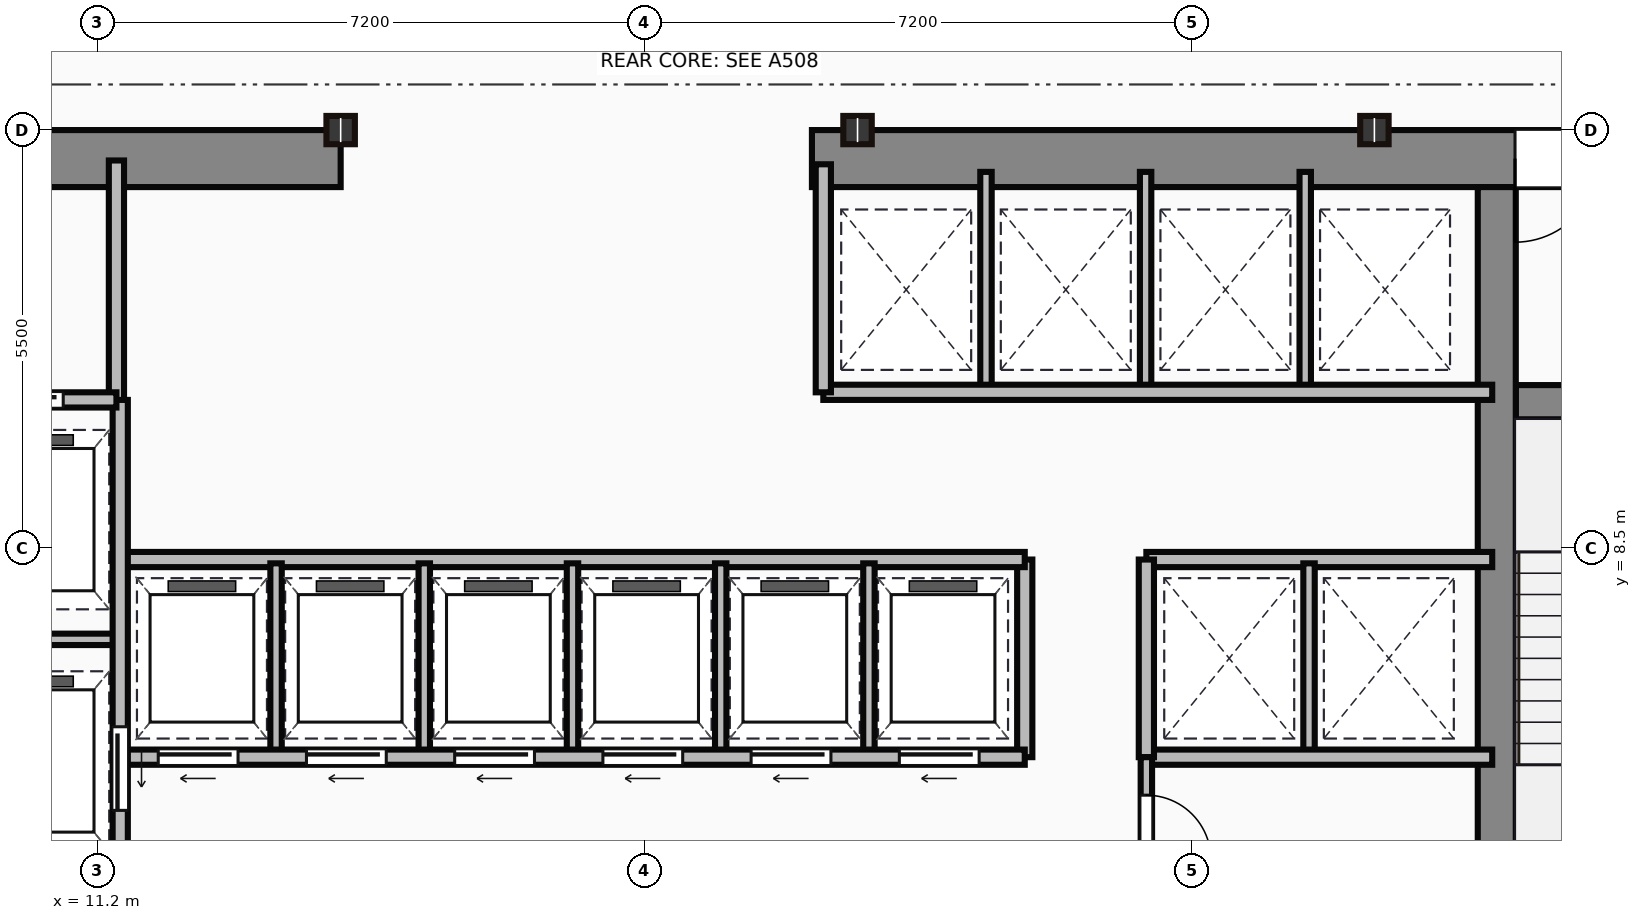
"""IFC4 building model, lengths in metres.
Left out: names, types, materials, properties, quantities, classifications, styles, units other than length and angle.
Written with IfcOpenShell. Run it as: python <this file> out.ifc"""

import sys

from ifc_helpers import new_model, si_unit, direction, frame, frame_2d, origin, origin_2d, place, context, subcontext, project, spatial, rectangle, i_section, extrude, source, transform, mapped, element, fill, save


model = new_model("IFC4")
c1 = context("Model", 3, precision=1e-05, world=origin(), true_north=direction((0.0, 1.0)))
c2 = subcontext(c1, "Body", "Model", "MODEL_VIEW")
j1 = project(units=[si_unit("LENGTHUNIT", "METRE"), si_unit("PLANEANGLEUNIT", "RADIAN")], contexts=[c1])
p1 = place(None, origin())
s1 = spatial("IfcSite", under=j1, at=p1, CompositionType="ELEMENT")
p2 = place(p1, origin())
s2 = spatial("IfcBuilding", under=s1, at=p2, CompositionType="ELEMENT")
p3 = place(p2, frame((0.0, 0.0, 180.75)))
s3 = spatial("IfcBuildingStorey", under=s2, at=p3, CompositionType="ELEMENT", Elevation=180.75)
m1 = source(origin(), c2, "Body", "SweptSolid", [
    extrude(rectangle(XDim=9.1, YDim=0.75, at=frame_2d((4.55, 0.0))), origin(), (0.0, 0.0, 1.0), 3.65),
])
p4 = place(p3, frame((5.3, 13.625, 0.0), z_axis=(0.0, 0.0, 1.0), x_axis=(1.0, 0.0, 0.0)))
e1 = element("IfcWall", 1, at=p4, inside=s3, PredefinedType="SHEAR", context=c2, shape_type="MappedRepresentation", body=[
    mapped(m1, transform((0.0, 0.0, 0.0))),
])
p5 = place(p4, frame((4.1, 0.0, 0.0)))
e2 = element("IfcOpeningElement", 2, at=p5, cuts=e1, PredefinedType="OPENING", context=c2, shape_type="SweptSolid", body=[
    extrude(rectangle(XDim=1.1, YDim=2.15, at=frame_2d((0.55, 1.075))), frame((0.0, 0.385, 0.0), z_axis=(0.0, -1.0, 0.0), x_axis=(1.0, 0.0, 0.0)), (0.0, 0.0, 1.0), 0.77),
])
m2 = source(origin(), c2, "Body", "SweptSolid", [
    extrude(rectangle(XDim=12.6, YDim=0.75, at=frame_2d((6.3, 0.0))), origin(), (0.0, 0.0, 1.0), 3.65),
])
p6 = place(p3, frame((20.6, 13.625, 0.0), z_axis=(0.0, 0.0, 1.0), x_axis=(1.0, 0.0, 0.0)))
e3 = element("IfcWall", 3, at=p6, inside=s3, PredefinedType="SHEAR", context=c2, shape_type="MappedRepresentation", body=[
    mapped(m2, transform((0.0, 0.0, 0.0))),
])
p7 = place(p6, frame((9.25, 0.0, 0.0)))
e4 = element("IfcOpeningElement", 4, at=p7, cuts=e3, PredefinedType="OPENING", context=c2, shape_type="SweptSolid", body=[
    extrude(rectangle(XDim=1.1, YDim=2.15, at=frame_2d((0.55, 1.075))), frame((0.0, 0.385, 0.0), z_axis=(0.0, -1.0, 0.0), x_axis=(1.0, 0.0, 0.0)), (0.0, 0.0, 1.0), 0.77),
])
m3 = source(origin(), c2, "Body", "SweptSolid", [
    extrude(rectangle(XDim=12.35, YDim=0.5, at=frame_2d((6.175, 0.0))), origin(), (0.0, 0.0, 1.0), 3.65),
])
p8 = place(p3, frame((29.61, 0.9, 0.0), z_axis=(0.0, 0.0, 1.0), x_axis=(0.0, 1.0, 0.0)))
e5 = element("IfcWall", 5, at=p8, inside=s3, PredefinedType="SHEAR", context=c2, shape_type="MappedRepresentation", body=[
    mapped(m3, transform((0.0, 0.0, 0.0))),
])
m4 = source(origin(), c2, "Body", "SweptSolid", [
    extrude(rectangle(XDim=3.39, YDim=0.45, at=frame_2d((1.695, 0.0))), origin(), (0.0, 0.0, 1.0), 3.65),
])
p9 = place(p3, frame((29.86, 10.42, 0.0), z_axis=(0.0, 0.0, 1.0), x_axis=(1.0, 0.0, 0.0)))
e6 = element("IfcWall", 6, at=p9, inside=s3, PredefinedType="SHEAR", context=c2, shape_type="MappedRepresentation", body=[
    mapped(m4, transform((0.0, 0.0, 0.0))),
])
p10 = place(p9, frame((1.1, 0.0, 0.0)))
e7 = element("IfcOpeningElement", 7, at=p10, cuts=e6, PredefinedType="OPENING", context=c2, shape_type="SweptSolid", body=[
    extrude(rectangle(XDim=1.1, YDim=2.15, at=frame_2d((0.55, 1.075))), frame((0.0, 0.235, 0.0), z_axis=(0.0, -1.0, 0.0), x_axis=(1.0, 0.0, 0.0)), (0.0, 0.0, 1.0), 0.47),
])
m5 = source(origin(), c2, "Body", "SweptSolid", [
    extrude(i_section(OverallWidth=0.374, OverallDepth=0.372, WebThickness=0.016, FlangeThickness=0.026, at=origin_2d()), origin(), (0.0, 0.0, 1.0), 3.65),
])
for number, where, z_axis, x_axis in (
    (8, (14.4, 14.0, 0.0), (0.0, 0.0, 1.0), (1.0, 0.0, 0.0)),
    (9, (21.2, 14.0, 0.0), (0.0, 0.0, 1.0), (1.0, 0.0, 0.0)),
    (10, (28.0, 14.0, 0.0), (0.0, 0.0, 1.0), (1.0, 0.0, 0.0)),
):
    element("IfcColumn", number, at=place(p3, frame(where, z_axis=z_axis, x_axis=x_axis)), inside=s3, PredefinedType="COLUMN", context=c2, shape_type="MappedRepresentation", body=[
        mapped(m5, transform((0.0, 0.0, 0.0))),
    ])
m6 = source(origin(), c2, "Body", "SweptSolid", [
    extrude(rectangle(XDim=3.18, YDim=0.2, at=frame_2d((1.59, 0.0))), origin(), (0.0, 0.0, 1.0), 3.4),
])
p11 = place(p3, frame((11.45, 10.42, 0.0), z_axis=(0.0, 0.0, 1.0), x_axis=(0.0, 1.0, 0.0)))
e11 = element("IfcWall", 11, at=p11, inside=s3, PredefinedType="PARTITIONING", context=c2, shape_type="MappedRepresentation", body=[
    mapped(m6, transform((0.0, 0.0, 0.0))),
])
m7 = source(origin(), c2, "Body", "SweptSolid", [
    extrude(rectangle(XDim=2.35, YDim=0.2, at=frame_2d((1.175, 0.0))), origin(), (0.0, 0.0, 1.0), 3.4),
])
p12 = place(p3, frame((9.1, 10.45, 0.0), z_axis=(0.0, 0.0, 1.0), x_axis=(1.0, 0.0, 0.0)))
e12 = element("IfcWall", 12, at=p12, inside=s3, PredefinedType="PARTITIONING", context=c2, shape_type="MappedRepresentation", body=[
    mapped(m7, transform((0.0, 0.0, 0.0))),
])
p13 = place(p12, frame((0.55, 0.0, 0.0)))
e13 = element("IfcOpeningElement", 13, at=p13, cuts=e12, PredefinedType="OPENING", context=c2, shape_type="SweptSolid", body=[
    extrude(rectangle(XDim=1.1, YDim=2.15, at=frame_2d((0.55, 1.075))), frame((0.0, 0.11, 0.0), z_axis=(0.0, -1.0, 0.0), x_axis=(1.0, 0.0, 0.0)), (0.0, 0.0, 1.0), 0.22),
])
m8 = source(origin(), c2, "Body", "SweptSolid", [
    extrude(rectangle(XDim=9.6, YDim=0.2, at=frame_2d((4.8, 0.0))), origin(), (0.0, 0.0, 1.0), 3.4),
])
p14 = place(p3, frame((11.5, 0.85, 0.0), z_axis=(0.0, 0.0, 1.0), x_axis=(0.0, 1.0, 0.0)))
e14 = element("IfcWall", 14, at=p14, inside=s3, PredefinedType="PARTITIONING", context=c2, shape_type="MappedRepresentation", body=[
    mapped(m8, transform((0.0, 0.0, 0.0))),
])
p15 = place(p14, frame((4.2, 0.0, 0.0)))
e15 = element("IfcOpeningElement", 15, at=p15, cuts=e14, PredefinedType="OPENING", context=c2, shape_type="SweptSolid", body=[
    extrude(rectangle(XDim=1.1, YDim=2.15, at=frame_2d((0.55, 1.075))), frame((0.0, 0.11, 0.0), z_axis=(0.0, -1.0, 0.0), x_axis=(1.0, 0.0, 0.0)), (0.0, 0.0, 1.0), 0.22),
])
p16 = place(p14, frame((0.9, 0.0, 0.0)))
e16 = element("IfcOpeningElement", 16, at=p16, cuts=e14, PredefinedType="OPENING", context=c2, shape_type="SweptSolid", body=[
    extrude(rectangle(XDim=1.2, YDim=2.15, at=frame_2d((0.6, 1.075))), frame((0.0, 0.11, 0.0), z_axis=(0.0, -1.0, 0.0), x_axis=(1.0, 0.0, 0.0)), (0.0, 0.0, 1.0), 0.22),
])
m9 = source(origin(), c2, "Body", "SweptSolid", [
    extrude(rectangle(XDim=2.4, YDim=0.15, at=frame_2d((1.2, 0.0))), origin(), (0.0, 0.0, 1.0), 3.4),
])
p17 = place(p3, frame((9.1, 7.3, 0.0), z_axis=(0.0, 0.0, 1.0), x_axis=(1.0, 0.0, 0.0)))
e17 = element("IfcWall", 17, at=p17, inside=s3, PredefinedType="PARTITIONING", context=c2, shape_type="MappedRepresentation", body=[
    mapped(m9, transform((0.0, 0.0, 0.0))),
])
m10 = source(origin(), c2, "Body", "SweptSolid", [
    extrude(rectangle(XDim=11.85, YDim=0.2, at=frame_2d((5.925, 0.0))), origin(), (0.0, 0.0, 1.0), 3.4),
])
p18 = place(p3, frame((11.55, 5.75, 0.0), z_axis=(0.0, 0.0, 1.0), x_axis=(1.0, 0.0, 0.0)))
e18 = element("IfcWall", 18, at=p18, inside=s3, PredefinedType="PARTITIONING", context=c2, shape_type="MappedRepresentation", body=[
    mapped(m10, transform((0.0, 0.0, 0.0))),
])
p19 = place(p18, frame((0.45, 0.0, 0.0)))
e19 = element("IfcOpeningElement", 19, at=p19, cuts=e18, PredefinedType="OPENING", context=c2, shape_type="SweptSolid", body=[
    extrude(rectangle(XDim=1.05, YDim=2.15, at=frame_2d((0.525, 1.075))), frame((0.0, 0.11, 0.0), z_axis=(0.0, -1.0, 0.0), x_axis=(1.0, 0.0, 0.0)), (0.0, 0.0, 1.0), 0.22),
])
p20 = place(p18, frame((2.4, 0.0, 0.0)))
e20 = element("IfcOpeningElement", 20, at=p20, cuts=e18, PredefinedType="OPENING", context=c2, shape_type="SweptSolid", body=[
    extrude(rectangle(XDim=1.05, YDim=2.15, at=frame_2d((0.525, 1.075))), frame((0.0, 0.11, 0.0), z_axis=(0.0, -1.0, 0.0), x_axis=(1.0, 0.0, 0.0)), (0.0, 0.0, 1.0), 0.22),
])
p21 = place(p18, frame((4.35, 0.0, 0.0)))
e21 = element("IfcOpeningElement", 21, at=p21, cuts=e18, PredefinedType="OPENING", context=c2, shape_type="SweptSolid", body=[
    extrude(rectangle(XDim=1.05, YDim=2.15, at=frame_2d((0.525, 1.075))), frame((0.0, 0.11, 0.0), z_axis=(0.0, -1.0, 0.0), x_axis=(1.0, 0.0, 0.0)), (0.0, 0.0, 1.0), 0.22),
])
p22 = place(p18, frame((6.3, 0.0, 0.0)))
e22 = element("IfcOpeningElement", 22, at=p22, cuts=e18, PredefinedType="OPENING", context=c2, shape_type="SweptSolid", body=[
    extrude(rectangle(XDim=1.05, YDim=2.15, at=frame_2d((0.525, 1.075))), frame((0.0, 0.11, 0.0), z_axis=(0.0, -1.0, 0.0), x_axis=(1.0, 0.0, 0.0)), (0.0, 0.0, 1.0), 0.22),
])
p23 = place(p18, frame((8.25, 0.0, 0.0)))
e23 = element("IfcOpeningElement", 23, at=p23, cuts=e18, PredefinedType="OPENING", context=c2, shape_type="SweptSolid", body=[
    extrude(rectangle(XDim=1.05, YDim=2.15, at=frame_2d((0.525, 1.075))), frame((0.0, 0.11, 0.0), z_axis=(0.0, -1.0, 0.0), x_axis=(1.0, 0.0, 0.0)), (0.0, 0.0, 1.0), 0.22),
])
p24 = place(p18, frame((10.2, 0.0, 0.0)))
e24 = element("IfcOpeningElement", 24, at=p24, cuts=e18, PredefinedType="OPENING", context=c2, shape_type="SweptSolid", body=[
    extrude(rectangle(XDim=1.05, YDim=2.15, at=frame_2d((0.525, 1.075))), frame((0.0, 0.11, 0.0), z_axis=(0.0, -1.0, 0.0), x_axis=(1.0, 0.0, 0.0)), (0.0, 0.0, 1.0), 0.22),
])
p25 = place(p3, frame((11.55, 8.35, 0.0), z_axis=(0.0, 0.0, 1.0), x_axis=(1.0, 0.0, 0.0)))
e25 = element("IfcWall", 25, at=p25, inside=s3, PredefinedType="PARTITIONING", context=c2, shape_type="MappedRepresentation", body=[
    mapped(m10, transform((0.0, 0.0, 0.0))),
])
m11 = source(origin(), c2, "Body", "SweptSolid", [
    extrude(rectangle(XDim=2.6, YDim=0.2, at=frame_2d((1.3, 0.0))), origin(), (0.0, 0.0, 1.0), 3.4),
])
p26 = place(p3, frame((23.4, 5.75, 0.0), z_axis=(0.0, 0.0, 1.0), x_axis=(0.0, 1.0, 0.0)))
e26 = element("IfcWall", 26, at=p26, inside=s3, PredefinedType="PARTITIONING", context=c2, shape_type="MappedRepresentation", body=[
    mapped(m11, transform((0.0, 0.0, 0.0))),
])
m12 = source(origin(), c2, "Body", "SweptSolid", [
    extrude(rectangle(XDim=2.5, YDim=0.15, at=frame_2d((1.25, 0.0))), origin(), (0.0, 0.0, 1.0), 3.4),
])
for number, where, z_axis, x_axis in (
    (27, (13.55, 5.8, 0.0), (0.0, 0.0, 1.0), (0.0, 1.0, 0.0)),
    (28, (15.5, 5.8, 0.0), (0.0, 0.0, 1.0), (0.0, 1.0, 0.0)),
    (29, (17.45, 5.8, 0.0), (0.0, 0.0, 1.0), (0.0, 1.0, 0.0)),
    (30, (19.4, 5.8, 0.0), (0.0, 0.0, 1.0), (0.0, 1.0, 0.0)),
    (31, (21.35, 5.8, 0.0), (0.0, 0.0, 1.0), (0.0, 1.0, 0.0)),
):
    element("IfcWall", number, at=place(p3, frame(where, z_axis=z_axis, x_axis=x_axis)), inside=s3, PredefinedType="PARTITIONING", context=c2, shape_type="MappedRepresentation", body=[
        mapped(m12, transform((0.0, 0.0, 0.0))),
    ])
m13 = source(origin(), c2, "Body", "SweptSolid", [
    extrude(rectangle(XDim=8.8, YDim=0.2, at=frame_2d((4.4, 0.0))), origin(), (0.0, 0.0, 1.0), 3.4),
])
p27 = place(p3, frame((20.75, 10.55, 0.0), z_axis=(0.0, 0.0, 1.0), x_axis=(1.0, 0.0, 0.0)))
e32 = element("IfcWall", 32, at=p27, inside=s3, PredefinedType="PARTITIONING", context=c2, shape_type="MappedRepresentation", body=[
    mapped(m13, transform((0.0, 0.0, 0.0))),
])
m14 = source(origin(), c2, "Body", "SweptSolid", [
    extrude(rectangle(XDim=3.0, YDim=0.2, at=frame_2d((1.5, 0.0))), origin(), (0.0, 0.0, 1.0), 3.4),
])
p28 = place(p3, frame((20.75, 10.55, 0.0), z_axis=(0.0, 0.0, 1.0), x_axis=(0.0, 1.0, 0.0)))
e33 = element("IfcWall", 33, at=p28, inside=s3, PredefinedType="PARTITIONING", context=c2, shape_type="MappedRepresentation", body=[
    mapped(m14, transform((0.0, 0.0, 0.0))),
])
m15 = source(origin(), c2, "Body", "SweptSolid", [
    extrude(rectangle(XDim=2.85, YDim=0.15, at=frame_2d((1.425, 0.0))), origin(), (0.0, 0.0, 1.0), 3.4),
])
for number, where, z_axis, x_axis in (
    (34, (22.89, 10.6, 0.0), (0.0, 0.0, 1.0), (0.0, 1.0, 0.0)),
    (35, (24.99, 10.6, 0.0), (0.0, 0.0, 1.0), (0.0, 1.0, 0.0)),
    (36, (27.09, 10.6, 0.0), (0.0, 0.0, 1.0), (0.0, 1.0, 0.0)),
):
    element("IfcWall", number, at=place(p3, frame(where, z_axis=z_axis, x_axis=x_axis)), inside=s3, PredefinedType="PARTITIONING", context=c2, shape_type="MappedRepresentation", body=[
        mapped(m15, transform((0.0, 0.0, 0.0))),
    ])
m16 = source(origin(), c2, "Body", "SweptSolid", [
    extrude(rectangle(XDim=4.55, YDim=0.2, at=frame_2d((2.275, 0.0))), origin(), (0.0, 0.0, 1.0), 3.4),
])
for number, where, z_axis, x_axis in (
    (37, (25.0, 8.35, 0.0), (0.0, 0.0, 1.0), (1.0, 0.0, 0.0)),
    (38, (25.0, 5.75, 0.0), (0.0, 0.0, 1.0), (1.0, 0.0, 0.0)),
):
    element("IfcWall", number, at=place(p3, frame(where, z_axis=z_axis, x_axis=x_axis)), inside=s3, PredefinedType="PARTITIONING", context=c2, shape_type="MappedRepresentation", body=[
        mapped(m16, transform((0.0, 0.0, 0.0))),
    ])
p29 = place(p3, frame((25.0, 5.75, 0.0), z_axis=(0.0, 0.0, 1.0), x_axis=(0.0, 1.0, 0.0)))
e39 = element("IfcWall", 39, at=p29, inside=s3, PredefinedType="PARTITIONING", context=c2, shape_type="MappedRepresentation", body=[
    mapped(m11, transform((0.0, 0.0, 0.0))),
])
p30 = place(p3, frame((27.14, 5.8, 0.0), z_axis=(0.0, 0.0, 1.0), x_axis=(0.0, 1.0, 0.0)))
e40 = element("IfcWall", 40, at=p30, inside=s3, PredefinedType="PARTITIONING", context=c2, shape_type="MappedRepresentation", body=[
    mapped(m12, transform((0.0, 0.0, 0.0))),
])
m17 = source(origin(), c2, "Body", "SweptSolid", [
    extrude(rectangle(XDim=4.9, YDim=0.15, at=frame_2d((2.45, 0.0))), origin(), (0.0, 0.0, 1.0), 3.4),
])
p31 = place(p3, frame((25.0, 0.85, 0.0), z_axis=(0.0, 0.0, 1.0), x_axis=(0.0, 1.0, 0.0)))
e41 = element("IfcWall", 41, at=p31, inside=s3, PredefinedType="PARTITIONING", context=c2, shape_type="MappedRepresentation", body=[
    mapped(m17, transform((0.0, 0.0, 0.0))),
])
p32 = place(p31, frame((1.85, 0.0, 0.0)))
e42 = element("IfcOpeningElement", 42, at=p32, cuts=e41, PredefinedType="OPENING", context=c2, shape_type="SweptSolid", body=[
    extrude(rectangle(XDim=0.95, YDim=2.15, at=frame_2d((0.475, 1.075))), frame((0.0, 0.085, 0.0), z_axis=(0.0, -1.0, 0.0), x_axis=(1.0, 0.0, 0.0)), (0.0, 0.0, 1.0), 0.17),
])
p33 = place(p31, frame((3.55, 0.0, 0.0)))
e43 = element("IfcOpeningElement", 43, at=p33, cuts=e41, PredefinedType="OPENING", context=c2, shape_type="SweptSolid", body=[
    extrude(rectangle(XDim=0.85, YDim=2.15, at=frame_2d((0.425, 1.075))), frame((0.0, 0.085, 0.0), z_axis=(0.0, -1.0, 0.0), x_axis=(1.0, 0.0, 0.0)), (0.0, 0.0, 1.0), 0.17),
])
m18 = source(origin(), c2, "Body", "SweptSolid", [
    extrude(rectangle(XDim=1.1, YDim=2.15, at=frame_2d((0.55, 1.075))), frame((0.0, 0.025, 0.0), z_axis=(0.0, -1.0, 0.0), x_axis=(1.0, 0.0, 0.0)), (0.0, 0.0, 1.0), 0.05),
])
p34 = place(p7, origin())
e44 = element("IfcDoor", 44, at=p34, inside=s3, OperationType="SINGLE_SWING_LEFT", PredefinedType="DOOR", context=c2, shape_type="MappedRepresentation", body=[
    mapped(m18, transform((0.0, 0.0, 0.0))),
])
fill(e4, e44)
p35 = place(p13, origin())
e45 = element("IfcDoor", 45, at=p35, inside=s3, OperationType="SLIDING_TO_LEFT", PredefinedType="DOOR", context=c2, shape_type="MappedRepresentation", body=[
    mapped(m18, transform((0.0, 0.0, 0.0))),
])
fill(e13, e45)
p36 = place(p15, frame((1.1, 0.0, 0.0), z_axis=(0.0, 0.0, 1.0), x_axis=(-1.0, 0.0, 0.0)))
e46 = element("IfcDoor", 46, at=p36, inside=s3, OperationType="SLIDING_TO_LEFT", PredefinedType="DOOR", context=c2, shape_type="MappedRepresentation", body=[
    mapped(m18, transform((0.0, 0.0, 0.0))),
])
fill(e15, e46)
m19 = source(origin(), c2, "Body", "SweptSolid", [
    extrude(rectangle(XDim=1.05, YDim=2.15, at=frame_2d((0.525, 1.075))), frame((0.0, 0.025, 0.0), z_axis=(0.0, -1.0, 0.0), x_axis=(1.0, 0.0, 0.0)), (0.0, 0.0, 1.0), 0.05),
])
p37 = place(p19, frame((1.05, 0.0, 0.0), z_axis=(0.0, 0.0, 1.0), x_axis=(-1.0, 0.0, 0.0)))
e47 = element("IfcDoor", 47, at=p37, inside=s3, OperationType="SLIDING_TO_LEFT", PredefinedType="DOOR", context=c2, shape_type="MappedRepresentation", body=[
    mapped(m19, transform((0.0, 0.0, 0.0))),
])
fill(e19, e47)
p38 = place(p20, frame((1.05, 0.0, 0.0), z_axis=(0.0, 0.0, 1.0), x_axis=(-1.0, 0.0, 0.0)))
e48 = element("IfcDoor", 48, at=p38, inside=s3, OperationType="SLIDING_TO_LEFT", PredefinedType="DOOR", context=c2, shape_type="MappedRepresentation", body=[
    mapped(m19, transform((0.0, 0.0, 0.0))),
])
fill(e20, e48)
p39 = place(p21, frame((1.05, 0.0, 0.0), z_axis=(0.0, 0.0, 1.0), x_axis=(-1.0, 0.0, 0.0)))
e49 = element("IfcDoor", 49, at=p39, inside=s3, OperationType="SLIDING_TO_LEFT", PredefinedType="DOOR", context=c2, shape_type="MappedRepresentation", body=[
    mapped(m19, transform((0.0, 0.0, 0.0))),
])
fill(e21, e49)
p40 = place(p22, frame((1.05, 0.0, 0.0), z_axis=(0.0, 0.0, 1.0), x_axis=(-1.0, 0.0, 0.0)))
e50 = element("IfcDoor", 50, at=p40, inside=s3, OperationType="SLIDING_TO_LEFT", PredefinedType="DOOR", context=c2, shape_type="MappedRepresentation", body=[
    mapped(m19, transform((0.0, 0.0, 0.0))),
])
fill(e22, e50)
p41 = place(p23, frame((1.05, 0.0, 0.0), z_axis=(0.0, 0.0, 1.0), x_axis=(-1.0, 0.0, 0.0)))
e51 = element("IfcDoor", 51, at=p41, inside=s3, OperationType="SLIDING_TO_LEFT", PredefinedType="DOOR", context=c2, shape_type="MappedRepresentation", body=[
    mapped(m19, transform((0.0, 0.0, 0.0))),
])
fill(e23, e51)
p42 = place(p24, frame((1.05, 0.0, 0.0), z_axis=(0.0, 0.0, 1.0), x_axis=(-1.0, 0.0, 0.0)))
e52 = element("IfcDoor", 52, at=p42, inside=s3, OperationType="SLIDING_TO_LEFT", PredefinedType="DOOR", context=c2, shape_type="MappedRepresentation", body=[
    mapped(m19, transform((0.0, 0.0, 0.0))),
])
fill(e24, e52)
m20 = source(origin(), c2, "Body", "SweptSolid", [
    extrude(rectangle(XDim=0.85, YDim=2.15, at=frame_2d((0.425, 1.075))), frame((0.0, 0.025, 0.0), z_axis=(0.0, -1.0, 0.0), x_axis=(1.0, 0.0, 0.0)), (0.0, 0.0, 1.0), 0.05),
])
p43 = place(p33, origin())
e53 = element("IfcDoor", 53, at=p43, inside=s3, OperationType="SINGLE_SWING_LEFT", PredefinedType="DOOR", context=c2, shape_type="MappedRepresentation", body=[
    mapped(m20, transform((0.0, 0.0, 0.0))),
])
fill(e43, e53)
save(model, sys.argv[1])
